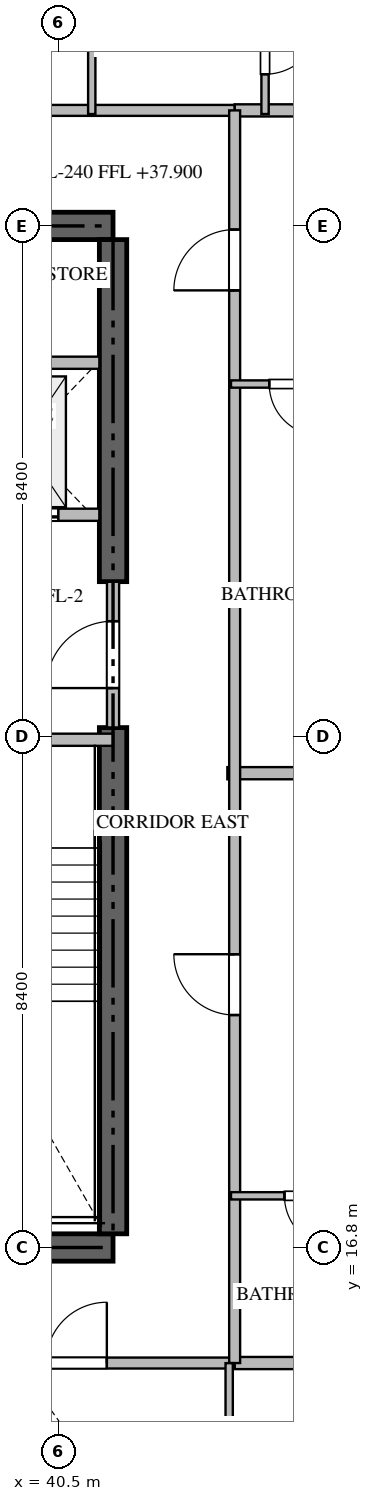
"""IFC4 building model, lengths in metres.
Left out: names, types, materials, properties, quantities, classifications, styles, units other than length and angle.
Written with IfcOpenShell. Run it as: python <this file> out.ifc"""

import sys

from ifc_helpers import new_model, si_unit, direction, frame, frame_2d, origin, place, context, subcontext, project, spatial, rectangle, extrude, source, transform, mapped, element, fill, save


model = new_model("IFC4")
c1 = context("Model", 3, precision=1e-05, world=origin(), true_north=direction((0.0, 1.0)))
c2 = subcontext(c1, "Body", "Model", "MODEL_VIEW")
j1 = project(units=[si_unit("LENGTHUNIT", "METRE"), si_unit("PLANEANGLEUNIT", "RADIAN")], contexts=[c1])
p1 = place(None, origin())
s1 = spatial("IfcSite", under=j1, at=p1, CompositionType="ELEMENT")
p2 = place(p1, origin())
s2 = spatial("IfcBuilding", under=s1, at=p2, CompositionType="ELEMENT")
p3 = place(p2, frame((0.0, 0.0, 37.95)))
s3 = spatial("IfcBuildingStorey", under=s2, at=p3, CompositionType="ELEMENT", Elevation=37.95)
for number, where, z_axis, x_axis in (
    (1, (23.4, 16.8, -0.26), (0.0, 0.0, 1.0), (1.0, 0.0, 0.0)),
    (2, (41.4, 33.6, -0.26), (0.0, 0.0, 1.0), (-1.0, 0.0, 0.0)),
):
    element("IfcWall", number, at=place(p3, frame(where, z_axis=z_axis, x_axis=x_axis)), inside=s3, PredefinedType="SHEAR", context=c2, shape_type="SweptSolid", body=[
        extrude(rectangle(XDim=18.0, YDim=0.45, at=frame_2d((9.0, 0.0))), origin(), (0.0, 0.0, 1.0), 3.748),
    ])
p4 = place(p3, frame((41.4, 17.025, -0.26), z_axis=(0.0, 0.0, 1.0), x_axis=(0.0, 1.0, 0.0)))
e3 = element("IfcWall", 3, at=p4, inside=s3, PredefinedType="SHEAR", context=c2, shape_type="SweptSolid", body=[
    extrude(rectangle(XDim=8.325, YDim=0.45, at=frame_2d((4.163, 0.0))), origin(), (0.0, 0.0, 1.0), 3.748),
])
p5 = place(p3, frame((41.4, 27.75, -0.26), z_axis=(0.0, 0.0, 1.0), x_axis=(0.0, 1.0, 0.0)))
e4 = element("IfcWall", 4, at=p5, inside=s3, PredefinedType="SHEAR", context=c2, shape_type="SweptSolid", body=[
    extrude(rectangle(XDim=5.625, YDim=0.45, at=frame_2d((2.812, 0.0))), origin(), (0.0, 0.0, 1.0), 3.748),
])
p6 = place(p3, frame((36.95, 25.15, 0.0), z_axis=(0.0, 0.0, 1.0), x_axis=(1.0, 0.0, 0.0)))
e5 = element("IfcWall", 5, at=p6, inside=s3, PredefinedType="STANDARD", context=c2, shape_type="SweptSolid", body=[
    extrude(rectangle(XDim=4.45, YDim=0.2, at=frame_2d((2.225, 0.0))), origin(), (0.0, 0.0, 1.0), 3.49),
])
p7 = place(p6, frame((1.65, 0.0, 0.0)))
e6 = element("IfcOpeningElement", 6, at=p7, cuts=e5, PredefinedType="OPENING", context=c2, shape_type="SweptSolid", body=[
    extrude(rectangle(XDim=1.1, YDim=2.15, at=frame_2d((0.55, 1.075))), frame((0.0, 0.11, 0.0), z_axis=(0.0, -1.0, 0.0), x_axis=(1.0, 0.0, 0.0)), (0.0, 0.0, 1.0), 0.22),
])
p8 = place(p3, frame((38.75, 28.85, 0.0), z_axis=(0.0, 0.0, 1.0), x_axis=(1.0, 0.0, 0.0)))
e7 = element("IfcWall", 7, at=p8, inside=s3, PredefinedType="STANDARD", context=c2, shape_type="SweptSolid", body=[
    extrude(rectangle(XDim=2.425, YDim=0.2, at=frame_2d((1.212, 0.0))), origin(), (0.0, 0.0, 1.0), 3.49),
])
p9 = place(p8, frame((0.55, 0.0, 0.0)))
e8 = element("IfcOpeningElement", 8, at=p9, cuts=e7, PredefinedType="OPENING", context=c2, shape_type="SweptSolid", body=[
    extrude(rectangle(XDim=1.2, YDim=2.2, at=frame_2d((0.6, 1.1))), frame((0.0, 0.11, 0.0), z_axis=(0.0, -1.0, 0.0), x_axis=(1.0, 0.0, 0.0)), (0.0, 0.0, 1.0), 0.22),
])
p10 = place(p3, frame((38.75, 31.35, 0.0), z_axis=(0.0, 0.0, 1.0), x_axis=(1.0, 0.0, 0.0)))
e9 = element("IfcWall", 9, at=p10, inside=s3, PredefinedType="STANDARD", context=c2, shape_type="SweptSolid", body=[
    extrude(rectangle(XDim=2.425, YDim=0.2, at=frame_2d((1.212, 0.0))), origin(), (0.0, 0.0, 1.0), 3.49),
])
p11 = place(p3, frame((41.4, 25.352, 0.0), z_axis=(0.0, 0.0, 1.0), x_axis=(0.0, 1.0, 0.0)))
e10 = element("IfcWall", 10, at=p11, inside=s3, PredefinedType="STANDARD", context=c2, shape_type="SweptSolid", body=[
    extrude(rectangle(XDim=2.396, YDim=0.2, at=frame_2d((1.198, 0.0))), origin(), (0.0, 0.0, 1.0), 3.49),
])
p12 = place(p11, frame((0.648, 0.0, 0.0)))
e11 = element("IfcOpeningElement", 11, at=p12, cuts=e10, PredefinedType="OPENING", context=c2, shape_type="SweptSolid", body=[
    extrude(rectangle(XDim=1.1, YDim=2.15, at=frame_2d((0.55, 1.075))), frame((0.0, 0.11, 0.0), z_axis=(0.0, -1.0, 0.0), x_axis=(1.0, 0.0, 0.0)), (0.0, 0.0, 1.0), 0.22),
])
p13 = place(p3, frame((43.28, 24.6, 0.0), z_axis=(0.0, 0.0, 1.0), x_axis=(1.0, 0.0, 0.0)))
e12 = element("IfcWall", 12, at=p13, inside=s3, PredefinedType="PARTITIONING", context=c2, shape_type="SweptSolid", body=[
    extrude(rectangle(XDim=15.438, YDim=0.2, at=frame_2d((7.719, 0.0))), origin(), (0.0, 0.0, 1.0), 3.49),
])
for number, where, z_axis, x_axis in (
    (13, (43.4, 14.9, 0.0), (0.0, 0.0, 1.0), (1.0, 0.0, 0.0)),
    (14, (43.4, 35.5, 0.0), (0.0, 0.0, 1.0), (1.0, 0.0, 0.0)),
):
    element("IfcWall", number, at=place(p3, frame(where, z_axis=z_axis, x_axis=x_axis)), inside=s3, PredefinedType="PARTITIONING", context=c2, shape_type="SweptSolid", body=[
        extrude(rectangle(XDim=15.318, YDim=0.2, at=frame_2d((7.659, 0.0))), origin(), (0.0, 0.0, 1.0), 3.49),
    ])
p14 = place(p3, frame((21.402, 14.9, 0.0), z_axis=(0.0, 0.0, 1.0), x_axis=(1.0, 0.0, 0.0)))
e15 = element("IfcWall", 15, at=p14, inside=s3, PredefinedType="PARTITIONING", context=c2, shape_type="SweptSolid", body=[
    extrude(rectangle(XDim=21.996, YDim=0.18, at=frame_2d((10.998, 0.0))), origin(), (0.0, 0.0, 1.0), 3.49),
])
p15 = place(p14, frame((2.1, 0.0, 0.0)))
e16 = element("IfcOpeningElement", 16, at=p15, cuts=e15, PredefinedType="OPENING", context=c2, shape_type="SweptSolid", body=[
    extrude(rectangle(XDim=1.0, YDim=2.15, at=frame_2d((0.5, 1.075))), frame((0.0, 0.1, 0.0), z_axis=(0.0, -1.0, 0.0), x_axis=(1.0, 0.0, 0.0)), (0.0, 0.0, 1.0), 0.2),
])
p16 = place(p14, frame((14.109, 0.0, 0.0)))
e17 = element("IfcOpeningElement", 17, at=p16, cuts=e15, PredefinedType="OPENING", context=c2, shape_type="SweptSolid", body=[
    extrude(rectangle(XDim=1.0, YDim=2.15, at=frame_2d((0.5, 1.075))), frame((0.0, 0.1, 0.0), z_axis=(0.0, -1.0, 0.0), x_axis=(1.0, 0.0, 0.0)), (0.0, 0.0, 1.0), 0.2),
])
p17 = place(p14, frame((18.896, 0.0, 0.0)))
e18 = element("IfcOpeningElement", 18, at=p17, cuts=e15, PredefinedType="OPENING", context=c2, shape_type="SweptSolid", body=[
    extrude(rectangle(XDim=1.0, YDim=2.15, at=frame_2d((0.5, 1.075))), frame((0.0, 0.1, 0.0), z_axis=(0.0, -1.0, 0.0), x_axis=(1.0, 0.0, 0.0)), (0.0, 0.0, 1.0), 0.2),
])
p18 = place(p3, frame((21.402, 35.5, 0.0), z_axis=(0.0, 0.0, 1.0), x_axis=(1.0, 0.0, 0.0)))
e19 = element("IfcWall", 19, at=p18, inside=s3, PredefinedType="PARTITIONING", context=c2, shape_type="SweptSolid", body=[
    extrude(rectangle(XDim=21.996, YDim=0.18, at=frame_2d((10.998, 0.0))), origin(), (0.0, 0.0, 1.0), 3.49),
])
p19 = place(p18, frame((2.1, 0.0, 0.0)))
e20 = element("IfcOpeningElement", 20, at=p19, cuts=e19, PredefinedType="OPENING", context=c2, shape_type="SweptSolid", body=[
    extrude(rectangle(XDim=1.0, YDim=2.15, at=frame_2d((0.5, 1.075))), frame((0.0, 0.1, 0.0), z_axis=(0.0, -1.0, 0.0), x_axis=(1.0, 0.0, 0.0)), (0.0, 0.0, 1.0), 0.2),
])
p20 = place(p18, frame((10.498, 0.0, 0.0)))
e21 = element("IfcOpeningElement", 21, at=p20, cuts=e19, PredefinedType="OPENING", context=c2, shape_type="SweptSolid", body=[
    extrude(rectangle(XDim=1.0, YDim=2.15, at=frame_2d((0.5, 1.075))), frame((0.0, 0.1, 0.0), z_axis=(0.0, -1.0, 0.0), x_axis=(1.0, 0.0, 0.0)), (0.0, 0.0, 1.0), 0.2),
])
p21 = place(p18, frame((16.272, 0.0, 0.0)))
e22 = element("IfcOpeningElement", 22, at=p21, cuts=e19, PredefinedType="OPENING", context=c2, shape_type="SweptSolid", body=[
    extrude(rectangle(XDim=1.0, YDim=2.15, at=frame_2d((0.5, 1.075))), frame((0.0, 0.1, 0.0), z_axis=(0.0, -1.0, 0.0), x_axis=(1.0, 0.0, 0.0)), (0.0, 0.0, 1.0), 0.2),
])
p22 = place(p3, frame((43.4, 14.9, 0.0), z_axis=(0.0, 0.0, 1.0), x_axis=(0.0, 1.0, 0.0)))
e23 = element("IfcWall", 23, at=p22, inside=s3, PredefinedType="PARTITIONING", context=c2, shape_type="SweptSolid", body=[
    extrude(rectangle(XDim=20.6, YDim=0.18, at=frame_2d((10.3, 0.0))), origin(), (0.0, 0.0, 1.0), 3.49),
])
p23 = place(p22, frame((5.723, 0.0, 0.0)))
e24 = element("IfcOpeningElement", 24, at=p23, cuts=e23, PredefinedType="OPENING", context=c2, shape_type="SweptSolid", body=[
    extrude(rectangle(XDim=1.0, YDim=2.15, at=frame_2d((0.5, 1.075))), frame((0.0, 0.1, 0.0), z_axis=(0.0, -1.0, 0.0), x_axis=(1.0, 0.0, 0.0)), (0.0, 0.0, 1.0), 0.2),
])
p24 = place(p22, frame((17.64, 0.0, 0.0)))
e25 = element("IfcOpeningElement", 25, at=p24, cuts=e23, PredefinedType="OPENING", context=c2, shape_type="SweptSolid", body=[
    extrude(rectangle(XDim=1.0, YDim=2.15, at=frame_2d((0.5, 1.075))), frame((0.0, 0.1, 0.0), z_axis=(0.0, -1.0, 0.0), x_axis=(1.0, 0.0, 0.0)), (0.0, 0.0, 1.0), 0.2),
])
p25 = place(p3, frame((43.31, 12.15, 0.0), z_axis=(0.0, 0.0, 1.0), x_axis=(0.0, 1.0, 0.0)))
e26 = element("IfcWall", 26, at=p25, inside=s3, PredefinedType="PARTITIONING", context=c2, shape_type="SweptSolid", body=[
    extrude(rectangle(XDim=2.748, YDim=0.12, at=frame_2d((1.374, 0.0))), origin(), (0.0, 0.0, 1.0), 3.49),
])
p26 = place(p3, frame((41.05, 38.25, 0.0), z_axis=(0.0, 0.0, 1.0), x_axis=(0.0, -1.0, 0.0)))
e27 = element("IfcWall", 27, at=p26, inside=s3, PredefinedType="PARTITIONING", context=c2, shape_type="SweptSolid", body=[
    extrude(rectangle(XDim=2.81, YDim=0.12, at=frame_2d((1.405, 0.0))), origin(), (0.0, 0.0, 1.0), 3.49),
])
p27 = place(p3, frame((43.9, 37.65, 0.0), z_axis=(0.0, 0.0, 1.0), x_axis=(0.0, -1.0, 0.0)))
e28 = element("IfcWall", 28, at=p27, inside=s3, PredefinedType="PARTITIONING", context=c2, shape_type="SweptSolid", body=[
    extrude(rectangle(XDim=2.21, YDim=0.12, at=frame_2d((1.105, 0.0))), origin(), (0.0, 0.0, 1.0), 3.49),
])
p28 = place(p27, frame((0.655, 0.0, 0.0)))
e29 = element("IfcOpeningElement", 29, at=p28, cuts=e28, PredefinedType="OPENING", context=c2, shape_type="SweptSolid", body=[
    extrude(rectangle(XDim=0.9, YDim=2.1, at=frame_2d((0.45, 1.05))), frame((0.0, 0.07, 0.0), z_axis=(0.0, -1.0, 0.0), x_axis=(1.0, 0.0, 0.0)), (0.0, 0.0, 1.0), 0.14),
])
p29 = place(p3, frame((45.948, 17.65, 0.0), z_axis=(0.0, 0.0, 1.0), x_axis=(-1.0, 0.0, 0.0)))
e30 = element("IfcWall", 30, at=p29, inside=s3, PredefinedType="PARTITIONING", context=c2, shape_type="SweptSolid", body=[
    extrude(rectangle(XDim=2.608, YDim=0.12, at=frame_2d((1.304, 0.0))), origin(), (0.0, 0.0, 1.0), 3.49),
])
p30 = place(p29, frame((0.879, 0.0, 0.0)))
e31 = element("IfcOpeningElement", 31, at=p30, cuts=e30, PredefinedType="OPENING", context=c2, shape_type="SweptSolid", body=[
    extrude(rectangle(XDim=0.85, YDim=2.1, at=frame_2d((0.425, 1.05))), frame((0.0, 0.07, 0.0), z_axis=(0.0, -1.0, 0.0), x_axis=(1.0, 0.0, 0.0)), (0.0, 0.0, 1.0), 0.14),
])
p31 = place(p3, frame((45.448, 31.0, 0.0), z_axis=(0.0, 0.0, 1.0), x_axis=(-1.0, 0.0, 0.0)))
e32 = element("IfcWall", 32, at=p31, inside=s3, PredefinedType="PARTITIONING", context=c2, shape_type="SweptSolid", body=[
    extrude(rectangle(XDim=2.108, YDim=0.12, at=frame_2d((1.054, 0.0))), origin(), (0.0, 0.0, 1.0), 3.49),
])
p32 = place(p31, frame((0.629, 0.0, 0.0)))
e33 = element("IfcOpeningElement", 33, at=p32, cuts=e32, PredefinedType="OPENING", context=c2, shape_type="SweptSolid", body=[
    extrude(rectangle(XDim=0.85, YDim=2.1, at=frame_2d((0.425, 1.05))), frame((0.0, 0.07, 0.0), z_axis=(0.0, -1.0, 0.0), x_axis=(1.0, 0.0, 0.0)), (0.0, 0.0, 1.0), 0.14),
])
m1 = source(origin(), c2, "Body", "SweptSolid", [
    extrude(rectangle(XDim=1.2, YDim=2.2, at=frame_2d((0.6, 1.1))), frame((0.0, 0.025, 0.0), z_axis=(0.0, -1.0, 0.0), x_axis=(1.0, 0.0, 0.0)), (0.0, 0.0, 1.0), 0.05),
])
p33 = place(p9, origin())
e34 = element("IfcDoor", 34, at=p33, inside=s3, OperationType="DOUBLE_DOOR_SLIDING", PredefinedType="DOOR", context=c2, shape_type="MappedRepresentation", body=[
    mapped(m1, transform((0.0, 0.0, 0.0), scale=1.0)),
])
fill(e8, e34)
m2 = source(origin(), c2, "Body", "SweptSolid", [
    extrude(rectangle(XDim=1.1, YDim=2.15, at=frame_2d((0.55, 1.075))), frame((0.0, 0.025, 0.0), z_axis=(0.0, -1.0, 0.0), x_axis=(1.0, 0.0, 0.0)), (0.0, 0.0, 1.0), 0.05),
])
p34 = place(p12, origin())
e35 = element("IfcDoor", 35, at=p34, inside=s3, OperationType="SINGLE_SWING_LEFT", PredefinedType="DOOR", context=c2, shape_type="MappedRepresentation", body=[
    mapped(m2, transform((0.0, 0.0, 0.0), scale=1.0)),
])
fill(e11, e35)
m3 = source(origin(), c2, "Body", "SweptSolid", [
    extrude(rectangle(XDim=1.0, YDim=2.15, at=frame_2d((0.5, 1.075))), frame((0.0, 0.025, 0.0), z_axis=(0.0, -1.0, 0.0), x_axis=(1.0, 0.0, 0.0)), (0.0, 0.0, 1.0), 0.05),
])
p35 = place(p17, origin())
e36 = element("IfcDoor", 36, at=p35, inside=s3, OperationType="SINGLE_SWING_RIGHT", PredefinedType="DOOR", context=c2, shape_type="MappedRepresentation", body=[
    mapped(m3, transform((0.0, 0.0, 0.0), scale=1.0)),
])
fill(e18, e36)
p36 = place(p23, origin())
e37 = element("IfcDoor", 37, at=p36, inside=s3, OperationType="SINGLE_SWING_RIGHT", PredefinedType="DOOR", context=c2, shape_type="MappedRepresentation", body=[
    mapped(m3, transform((0.0, 0.0, 0.0), scale=1.0)),
])
fill(e24, e37)
p37 = place(p24, origin())
e38 = element("IfcDoor", 38, at=p37, inside=s3, OperationType="SINGLE_SWING_LEFT", PredefinedType="DOOR", context=c2, shape_type="MappedRepresentation", body=[
    mapped(m3, transform((0.0, 0.0, 0.0), scale=1.0)),
])
fill(e25, e38)
m4 = source(origin(), c2, "Body", "SweptSolid", [
    extrude(rectangle(XDim=0.9, YDim=2.1, at=frame_2d((0.45, 1.05))), frame((0.0, 0.025, 0.0), z_axis=(0.0, -1.0, 0.0), x_axis=(1.0, 0.0, 0.0)), (0.0, 0.0, 1.0), 0.05),
])
p38 = place(p28, origin())
e39 = element("IfcDoor", 39, at=p38, inside=s3, OperationType="SINGLE_SWING_LEFT", PredefinedType="DOOR", context=c2, shape_type="MappedRepresentation", body=[
    mapped(m4, transform((0.0, 0.0, 0.0), scale=1.0)),
])
fill(e29, e39)
m5 = source(origin(), c2, "Body", "SweptSolid", [
    extrude(rectangle(XDim=0.85, YDim=2.1, at=frame_2d((0.425, 1.05))), frame((0.0, 0.025, 0.0), z_axis=(0.0, -1.0, 0.0), x_axis=(1.0, 0.0, 0.0)), (0.0, 0.0, 1.0), 0.05),
])
p39 = place(p30, origin())
e40 = element("IfcDoor", 40, at=p39, inside=s3, OperationType="SINGLE_SWING_LEFT", PredefinedType="DOOR", context=c2, shape_type="MappedRepresentation", body=[
    mapped(m5, transform((0.0, 0.0, 0.0), scale=1.0)),
])
fill(e31, e40)
p40 = place(p32, origin())
e41 = element("IfcDoor", 41, at=p40, inside=s3, OperationType="SINGLE_SWING_LEFT", PredefinedType="DOOR", context=c2, shape_type="MappedRepresentation", body=[
    mapped(m5, transform((0.0, 0.0, 0.0), scale=1.0)),
])
fill(e33, e41)
save(model, sys.argv[1])
